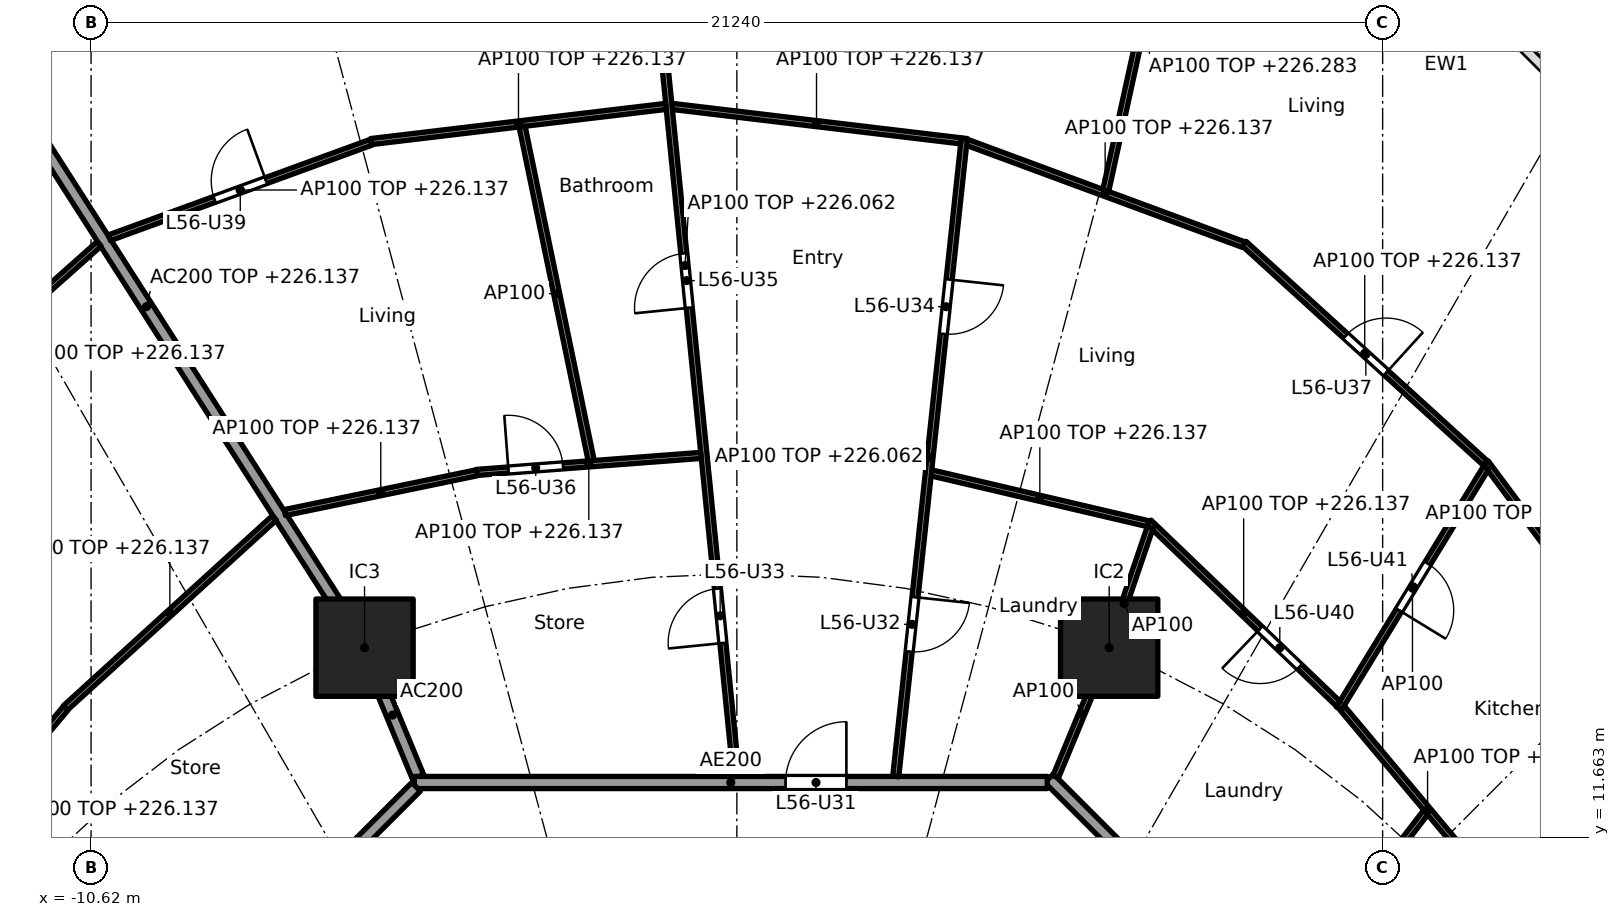
"""IFC4 building model, lengths in metres.
Left out: names, types, materials, properties, quantities, classifications, styles, units other than length and angle.
Written with IfcOpenShell. Run it as: python <this file> out.ifc"""

import sys

from ifc_helpers import new_model, si_unit, direction, frame, frame_2d, origin, origin_2d, place, context, subcontext, project, spatial, rectangle, extrude, element, fill, save


model = new_model("IFC4")
c1 = context("Model", 3, precision=1e-05, world=origin(), true_north=direction((0.0, 1.0)))
c2 = subcontext(c1, "Body", "Model", "MODEL_VIEW")
j1 = project(units=[si_unit("LENGTHUNIT", "METRE"), si_unit("PLANEANGLEUNIT", "RADIAN")], contexts=[c1])
p1 = place(None, origin())
s1 = spatial("IfcSite", under=j1, at=p1, CompositionType="ELEMENT")
p2 = place(p1, origin())
s2 = spatial("IfcBuilding", under=s1, at=p2, CompositionType="ELEMENT")
p3 = place(p2, frame((0.0, 0.0, 223.3)))
s3 = spatial("IfcBuildingStorey", under=s2, at=p3, CompositionType="ELEMENT", Elevation=223.3)
for number, where, z_axis, x_axis in (
    (1, (6.123, 14.782, 0.0), (0.0, 0.0, 1.0), (1.0, 0.0, 0.0)),
    (2, (-6.123, 14.782, 0.0), (0.0, 0.0, 1.0), (1.0, 0.0, 0.0)),
):
    element("IfcColumn", number, at=place(p3, frame(where, z_axis=z_axis, x_axis=x_axis)), inside=s3, PredefinedType="COLUMN", context=c2, shape_type="SweptSolid", body=[
        extrude(rectangle(XDim=1.6, YDim=1.6, at=origin_2d()), origin(), (0.0, 0.0, 1.0), 3.7),
    ])
p4 = place(p3, frame((-5.243, 12.657, 0.0), z_axis=(0.0, 0.0, 1.0), x_axis=(-0.382691608661, 0.923876145736, 0.0)))
e3 = element("IfcWall", 3, at=p4, inside=s3, PredefinedType="PARTITIONING", context=c2, shape_type="SweptSolid", body=[
    extrude(rectangle(XDim=2.2, YDim=0.2, at=frame_2d((1.1, 0.0))), origin(), (0.0, 0.0, 1.0), 3.44),
])
p5 = place(p3, frame((-6.15, 14.824, 0.0), z_axis=(0.0, 0.0, 1.0), x_axis=(-0.538870687577, 0.842388498301, 0.0)))
e4 = element("IfcWall", 4, at=p5, inside=s3, PredefinedType="PARTITIONING", context=c2, shape_type="SweptSolid", body=[
    extrude(rectangle(XDim=13.213, YDim=0.2, at=frame_2d((6.606, 0.0))), origin(), (0.0, 0.0, 1.0), 2.837),
])
p6 = place(p3, frame((12.635, 5.134, 0.0), z_axis=(0.0, 0.0, 1.0), x_axis=(-0.707106781187, 0.707106781187, 0.0)))
e5 = element("IfcWall", 5, at=p6, inside=s3, PredefinedType="PARTITIONING", context=c2, shape_type="SweptSolid", body=[
    extrude(rectangle(XDim=10.609, YDim=0.2, at=frame_2d((5.305, 0.0))), origin(), (0.0, 0.0, 1.0), 3.44),
])
p7 = place(p3, frame((5.104, 12.565, 0.0), z_axis=(0.0, 0.0, 1.0), x_axis=(-1.0, 0.0, 0.0)))
e6 = element("IfcWall", 6, at=p7, inside=s3, PredefinedType="PARTITIONING", context=c2, shape_type="SweptSolid", body=[
    extrude(rectangle(XDim=10.409, YDim=0.2, at=frame_2d((5.205, 0.0))), origin(), (0.0, 0.0, 1.0), 3.44),
])
p8 = place(p7, frame((3.303, 0.0, 0.0)))
e7 = element("IfcOpeningElement", 7, at=p8, cuts=e6, PredefinedType="OPENING", context=c2, shape_type="SweptSolid", body=[
    extrude(rectangle(XDim=1.0, YDim=2.1, at=frame_2d((0.5, 1.05))), frame((0.0, 0.11, 0.0), z_axis=(0.0, -1.0, 0.0), x_axis=(1.0, 0.0, 0.0)), (0.0, 0.0, 1.0), 0.22),
])
p9 = place(p3, frame((-5.275, 12.494, 0.0), z_axis=(0.0, 0.0, 1.0), x_axis=(-0.707106781187, -0.707106781187, 0.0)))
e8 = element("IfcWall", 8, at=p9, inside=s3, PredefinedType="PARTITIONING", context=c2, shape_type="SweptSolid", body=[
    extrude(rectangle(XDim=10.209, YDim=0.2, at=frame_2d((5.104, 0.0))), origin(), (0.0, 0.0, 1.0), 3.44),
])
p10 = place(p9, frame((6.339, 0.0, 0.0)))
e9 = element("IfcOpeningElement", 9, at=p10, cuts=e8, PredefinedType="OPENING", context=c2, shape_type="SweptSolid", body=[
    extrude(rectangle(XDim=1.0, YDim=2.1, at=frame_2d((0.5, 1.05))), frame((0.0, 0.11, 0.0), z_axis=(0.0, -1.0, 0.0), x_axis=(1.0, 0.0, 0.0)), (0.0, 0.0, 1.0), 0.22),
])
p11 = place(p3, frame((12.759, 10.443, 0.0), z_axis=(0.0, 0.0, 1.0), x_axis=(-0.642225196965, 0.766516011825, 0.0)))
e10 = element("IfcWall", 10, at=p11, inside=s3, PredefinedType="PARTITIONING", context=c2, shape_type="SweptSolid", body=[
    extrude(rectangle(XDim=4.361, YDim=0.1, at=frame_2d((2.18, 0.0))), origin(), (0.0, 0.0, 1.0), 2.837),
])
p12 = place(p3, frame((15.621, 13.374, 0.0), z_axis=(0.0, 0.0, 1.0), x_axis=(-0.596165830899, 0.802861321816, 0.0)))
e11 = element("IfcWall", 11, at=p12, inside=s3, PredefinedType="PARTITIONING", context=c2, shape_type="SweptSolid", body=[
    extrude(rectangle(XDim=5.542, YDim=0.1, at=frame_2d((2.771, 0.0))), origin(), (0.0, 0.0, 1.0), 2.837),
])
p13 = place(p3, frame((8.946, 8.964, 0.0), z_axis=(0.0, 0.0, 1.0), x_axis=(0.608213063121, 0.793773815296, 0.0)))
e12 = element("IfcWall", 12, at=p13, inside=s3, PredefinedType="PARTITIONING", context=c2, shape_type="SweptSolid", body=[
    extrude(rectangle(XDim=3.918, YDim=0.1, at=frame_2d((1.959, 0.0))), origin(), (0.0, 0.0, 1.0), 2.762),
])
p14 = place(p3, frame((9.9, 13.781, 0.0), z_axis=(0.0, 0.0, 1.0), x_axis=(0.521464905534, 0.853272730313, 0.0)))
e13 = element("IfcWall", 13, at=p14, inside=s3, PredefinedType="PARTITIONING", context=c2, shape_type="SweptSolid", body=[
    extrude(rectangle(XDim=4.641, YDim=0.1, at=frame_2d((2.32, 0.0))), origin(), (0.0, 0.0, 1.0), 3.44),
])
p15 = place(p14, frame((1.895, 0.0, 0.0)))
e14 = element("IfcOpeningElement", 14, at=p15, cuts=e13, PredefinedType="OPENING", context=c2, shape_type="SweptSolid", body=[
    extrude(rectangle(XDim=0.9, YDim=2.1, at=frame_2d((0.45, 1.05))), frame((0.0, 0.06, 0.0), z_axis=(0.0, -1.0, 0.0), x_axis=(1.0, 0.0, 0.0)), (0.0, 0.0, 1.0), 0.12),
])
p16 = place(p3, frame((9.89, 13.858, 0.0), z_axis=(0.0, 0.0, 1.0), x_axis=(-0.72167233993, 0.692234811159, 0.0)))
e15 = element("IfcWall", 15, at=p16, inside=s3, PredefinedType="PARTITIONING", context=c2, shape_type="SweptSolid", body=[
    extrude(rectangle(XDim=4.313, YDim=0.1, at=frame_2d((2.156, 0.0))), origin(), (0.0, 0.0, 1.0), 2.837),
])
p17 = place(p16, frame((0.883, 0.0, 0.0)))
e16 = element("IfcOpeningElement", 16, at=p17, cuts=e15, PredefinedType="OPENING", context=c2, shape_type="SweptSolid", body=[
    extrude(rectangle(XDim=0.9, YDim=2.1, at=frame_2d((0.45, 1.05))), frame((0.0, 0.06, 0.0), z_axis=(0.0, -1.0, 0.0), x_axis=(1.0, 0.0, 0.0)), (0.0, 0.0, 1.0), 0.12),
])
p18 = place(p3, frame((12.31, 17.817, 0.0), z_axis=(0.0, 0.0, 1.0), x_axis=(-0.739697052892, 0.672940019573, 0.0)))
e17 = element("IfcWall", 17, at=p18, inside=s3, PredefinedType="PARTITIONING", context=c2, shape_type="SweptSolid", body=[
    extrude(rectangle(XDim=5.365, YDim=0.1, at=frame_2d((2.683, 0.0))), origin(), (0.0, 0.0, 1.0), 2.837),
])
p19 = place(p18, frame((2.208, 0.0, 0.0)))
e18 = element("IfcOpeningElement", 18, at=p19, cuts=e17, PredefinedType="OPENING", context=c2, shape_type="SweptSolid", body=[
    extrude(rectangle(XDim=0.9, YDim=2.1, at=frame_2d((0.45, 1.05))), frame((0.0, 0.06, 0.0), z_axis=(0.0, -1.0, 0.0), x_axis=(1.0, 0.0, 0.0)), (0.0, 0.0, 1.0), 0.12),
])
p20 = place(p3, frame((5.243, 12.657, 0.0), z_axis=(0.0, 0.0, 1.0), x_axis=(0.382719158442, 0.923864733477, 0.0)))
e19 = element("IfcWall", 19, at=p20, inside=s3, PredefinedType="PARTITIONING", context=c2, shape_type="SweptSolid", body=[
    extrude(rectangle(XDim=2.25, YDim=0.1, at=frame_2d((1.125, 0.0))), origin(), (0.0, 0.0, 1.0), 3.44),
])
p21 = place(p3, frame((6.139, 14.829, 0.0), z_axis=(0.0, 0.0, 1.0), x_axis=(0.32278593828, 0.946471995385, 0.0)))
e20 = element("IfcWall", 20, at=p21, inside=s3, PredefinedType="PARTITIONING", context=c2, shape_type="SweptSolid", body=[
    extrude(rectangle(XDim=2.042, YDim=0.1, at=frame_2d((1.021, 0.0))), origin(), (0.0, 0.0, 1.0), 3.44),
])
p22 = place(p3, frame((6.766, 16.82, 0.0), z_axis=(0.0, 0.0, 1.0), x_axis=(-0.973612608559, 0.22820711745, 0.0)))
e21 = element("IfcWall", 21, at=p22, inside=s3, PredefinedType="PARTITIONING", context=c2, shape_type="SweptSolid", body=[
    extrude(rectangle(XDim=3.663, YDim=0.1, at=frame_2d((1.832, 0.0))), origin(), (0.0, 0.0, 1.0), 2.837),
])
p23 = place(p3, frame((8.331, 21.411, 0.0), z_axis=(0.0, 0.0, 1.0), x_axis=(-0.937891982431, 0.346927412136, 0.0)))
e22 = element("IfcWall", 22, at=p23, inside=s3, PredefinedType="PARTITIONING", context=c2, shape_type="SweptSolid", body=[
    extrude(rectangle(XDim=4.85, YDim=0.1, at=frame_2d((2.425, 0.0))), origin(), (0.0, 0.0, 1.0), 2.837),
])
p24 = place(p3, frame((6.067, 22.301, 0.0), z_axis=(0.0, 0.0, 1.0), x_axis=(0.214401821533, 0.976745544614, 0.0)))
e23 = element("IfcWall", 23, at=p24, inside=s3, PredefinedType="PARTITIONING", context=c2, shape_type="SweptSolid", body=[
    extrude(rectangle(XDim=6.228, YDim=0.1, at=frame_2d((3.114, 0.0))), origin(), (0.0, 0.0, 1.0), 2.983),
])
p25 = place(p24, frame((2.664, 0.0, 0.0)))
e24 = element("IfcOpeningElement", 24, at=p25, cuts=e23, PredefinedType="OPENING", context=c2, shape_type="SweptSolid", body=[
    extrude(rectangle(XDim=0.9, YDim=2.1, at=frame_2d((0.45, 1.05))), frame((0.0, 0.06, 0.0), z_axis=(0.0, -1.0, 0.0), x_axis=(1.0, 0.0, 0.0)), (0.0, 0.0, 1.0), 0.12),
])
p26 = place(p3, frame((2.613, 12.664, 0.0), z_axis=(0.0, 0.0, 1.0), x_axis=(0.106823825758, 0.994277964279, 0.0)))
e25 = element("IfcWall", 25, at=p26, inside=s3, PredefinedType="PARTITIONING", context=c2, shape_type="SweptSolid", body=[
    extrude(rectangle(XDim=10.556, YDim=0.1, at=frame_2d((5.278, 0.0))), origin(), (0.0, 0.0, 1.0), 2.762),
])
p27 = place(p26, frame((2.066, 0.0, 0.0)))
e26 = element("IfcOpeningElement", 26, at=p27, cuts=e25, PredefinedType="OPENING", context=c2, shape_type="SweptSolid", body=[
    extrude(rectangle(XDim=0.9, YDim=2.1, at=frame_2d((0.45, 1.05))), frame((0.0, 0.06, 0.0), z_axis=(0.0, -1.0, 0.0), x_axis=(1.0, 0.0, 0.0)), (0.0, 0.0, 1.0), 0.12),
])
p28 = place(p26, frame((7.32, 0.0, 0.0)))
e27 = element("IfcOpeningElement", 27, at=p28, cuts=e25, PredefinedType="OPENING", context=c2, shape_type="SweptSolid", body=[
    extrude(rectangle(XDim=0.9, YDim=2.1, at=frame_2d((0.45, 1.05))), frame((0.0, 0.06, 0.0), z_axis=(0.0, -1.0, 0.0), x_axis=(1.0, 0.0, 0.0)), (0.0, 0.0, 1.0), 0.12),
])
p29 = place(p3, frame((3.686, 23.117, 0.0), z_axis=(0.0, 0.0, 1.0), x_axis=(-0.992965872314, 0.11840091393, 0.0)))
e28 = element("IfcWall", 28, at=p29, inside=s3, PredefinedType="PARTITIONING", context=c2, shape_type="SweptSolid", body=[
    extrude(rectangle(XDim=4.786, YDim=0.1, at=frame_2d((2.393, 0.0))), origin(), (0.0, 0.0, 1.0), 2.837),
])
p30 = place(p3, frame((-0.01, 12.664, 0.0), z_axis=(0.0, 0.0, 1.0), x_axis=(-0.099808591851, 0.995006655753, 0.0)))
e29 = element("IfcWall", 29, at=p30, inside=s3, PredefinedType="PARTITIONING", context=c2, shape_type="SweptSolid", body=[
    extrude(rectangle(XDim=16.888, YDim=0.1, at=frame_2d((8.444, 0.0))), origin(), (0.0, 0.0, 1.0), 2.762),
])
p31 = place(p30, frame((2.205, 0.0, 0.0)))
e30 = element("IfcOpeningElement", 30, at=p31, cuts=e29, PredefinedType="OPENING", context=c2, shape_type="SweptSolid", body=[
    extrude(rectangle(XDim=0.9, YDim=2.1, at=frame_2d((0.45, 1.05))), frame((0.0, 0.06, 0.0), z_axis=(0.0, -1.0, 0.0), x_axis=(1.0, 0.0, 0.0)), (0.0, 0.0, 1.0), 0.12),
])
p32 = place(p30, frame((7.745, 0.0, 0.0)))
e31 = element("IfcOpeningElement", 31, at=p32, cuts=e29, PredefinedType="OPENING", context=c2, shape_type="SweptSolid", body=[
    extrude(rectangle(XDim=0.9, YDim=2.1, at=frame_2d((0.45, 1.05))), frame((0.0, 0.06, 0.0), z_axis=(0.0, -1.0, 0.0), x_axis=(1.0, 0.0, 0.0)), (0.0, 0.0, 1.0), 0.12),
])
p33 = place(p3, frame((-0.59, 17.944, 0.0), z_axis=(0.0, 0.0, 1.0), x_axis=(-0.997133495787, -0.075662352452, 0.0)))
e32 = element("IfcWall", 32, at=p33, inside=s3, PredefinedType="PARTITIONING", context=c2, shape_type="SweptSolid", body=[
    extrude(rectangle(XDim=3.701, YDim=0.1, at=frame_2d((1.851, 0.0))), origin(), (0.0, 0.0, 1.0), 2.837),
])
p34 = place(p33, frame((2.276, 0.0, 0.0)))
e33 = element("IfcOpeningElement", 33, at=p34, cuts=e32, PredefinedType="OPENING", context=c2, shape_type="SweptSolid", body=[
    extrude(rectangle(XDim=0.9, YDim=2.1, at=frame_2d((0.45, 1.05))), frame((0.0, 0.06, 0.0), z_axis=(0.0, -1.0, 0.0), x_axis=(1.0, 0.0, 0.0)), (0.0, 0.0, 1.0), 0.12),
])
p35 = place(p3, frame((-1.166, 23.683, 0.0), z_axis=(0.0, 0.0, 1.0), x_axis=(-0.992961712415, -0.118435795593, 0.0)))
e34 = element("IfcWall", 34, at=p35, inside=s3, PredefinedType="PARTITIONING", context=c2, shape_type="SweptSolid", body=[
    extrude(rectangle(XDim=4.885, YDim=0.1, at=frame_2d((2.443, 0.0))), origin(), (0.0, 0.0, 1.0), 2.837),
])
p36 = place(p3, frame((-2.395, 17.857, 0.0), z_axis=(0.0, 0.0, 1.0), x_axis=(-0.20251351451, 0.979279467997, 0.0)))
e35 = element("IfcWall", 35, at=p36, inside=s3, PredefinedType="PARTITIONING", context=c2, shape_type="SweptSolid", body=[
    extrude(rectangle(XDim=5.611, YDim=0.1, at=frame_2d((2.805, 0.0))), origin(), (0.0, 0.0, 1.0), 3.44),
])
p37 = place(p3, frame((-4.28, 17.657, 0.0), z_axis=(0.0, 0.0, 1.0), x_axis=(-0.979195545385, -0.202918909661, 0.0)))
e36 = element("IfcWall", 36, at=p37, inside=s3, PredefinedType="PARTITIONING", context=c2, shape_type="SweptSolid", body=[
    extrude(rectangle(XDim=3.221, YDim=0.1, at=frame_2d((1.61, 0.0))), origin(), (0.0, 0.0, 1.0), 2.837),
])
p38 = place(p3, frame((-6.014, 23.094, 0.0), z_axis=(0.0, 0.0, 1.0), x_axis=(-0.939433575811, -0.342731026665, 0.0)))
e37 = element("IfcWall", 37, at=p38, inside=s3, PredefinedType="PARTITIONING", context=c2, shape_type="SweptSolid", body=[
    extrude(rectangle(XDim=4.583, YDim=0.1, at=frame_2d((2.291, 0.0))), origin(), (0.0, 0.0, 1.0), 2.837),
])
p39 = place(p38, frame((1.841, 0.0, 0.0)))
e38 = element("IfcOpeningElement", 38, at=p39, cuts=e37, PredefinedType="OPENING", context=c2, shape_type="SweptSolid", body=[
    extrude(rectangle(XDim=0.9, YDim=2.1, at=frame_2d((0.45, 1.05))), frame((0.0, 0.06, 0.0), z_axis=(0.0, -1.0, 0.0), x_axis=(1.0, 0.0, 0.0)), (0.0, 0.0, 1.0), 0.12),
])
p40 = place(p3, frame((-7.605, 16.917, 0.0), z_axis=(0.0, 0.0, 1.0), x_axis=(-0.739828340504, -0.672795679673, 0.0)))
e39 = element("IfcWall", 39, at=p40, inside=s3, PredefinedType="PARTITIONING", context=c2, shape_type="SweptSolid", body=[
    extrude(rectangle(XDim=4.647, YDim=0.1, at=frame_2d((2.324, 0.0))), origin(), (0.0, 0.0, 1.0), 2.837),
])
p41 = place(p3, frame((-10.488, 21.422, 0.0), z_axis=(0.0, 0.0, 1.0), x_axis=(-0.747148551049, -0.664657086523, 0.0)))
e40 = element("IfcWall", 40, at=p41, inside=s3, PredefinedType="PARTITIONING", context=c2, shape_type="SweptSolid", body=[
    extrude(rectangle(XDim=5.425, YDim=0.1, at=frame_2d((2.712, 0.0))), origin(), (0.0, 0.0, 1.0), 2.837),
])
p42 = place(p41, frame((2.262, 0.0, 0.0)))
e41 = element("IfcOpeningElement", 41, at=p42, cuts=e40, PredefinedType="OPENING", context=c2, shape_type="SweptSolid", body=[
    extrude(rectangle(XDim=0.9, YDim=2.1, at=frame_2d((0.45, 1.05))), frame((0.0, 0.06, 0.0), z_axis=(0.0, -1.0, 0.0), x_axis=(1.0, 0.0, 0.0)), (0.0, 0.0, 1.0), 0.12),
])
p43 = place(p3, frame((-11.039, 13.785, 0.0), z_axis=(0.0, 0.0, 1.0), x_axis=(-0.642323585424, -0.766433566337, 0.0)))
e42 = element("IfcWall", 42, at=p43, inside=s3, PredefinedType="PARTITIONING", context=c2, shape_type="SweptSolid", body=[
    extrude(rectangle(XDim=2.13, YDim=0.1, at=frame_2d((1.065, 0.0))), origin(), (0.0, 0.0, 1.0), 2.837),
])
p44 = place(p3, frame((-8.959, 8.952, 0.0), z_axis=(0.0, 0.0, 1.0), x_axis=(-0.740140081805, 0.672452719011, 0.0)))
e43 = element("IfcWall", 43, at=p44, inside=s3, PredefinedType="PARTITIONING", context=c2, shape_type="SweptSolid", body=[
    extrude(rectangle(XDim=9.775, YDim=0.1, at=frame_2d((4.887, 0.0))), origin(), (0.0, 0.0, 1.0), 2.762),
])
p45 = place(p44, frame((1.901, 0.0, 0.0)))
e44 = element("IfcOpeningElement", 44, at=p45, cuts=e43, PredefinedType="OPENING", context=c2, shape_type="SweptSolid", body=[
    extrude(rectangle(XDim=0.9, YDim=2.1, at=frame_2d((0.45, 1.05))), frame((0.0, 0.06, 0.0), z_axis=(0.0, -1.0, 0.0), x_axis=(1.0, 0.0, 0.0)), (0.0, 0.0, 1.0), 0.12),
])
p46 = place(p44, frame((6.789, 0.0, 0.0)))
e45 = element("IfcOpeningElement", 45, at=p46, cuts=e43, PredefinedType="OPENING", context=c2, shape_type="SweptSolid", body=[
    extrude(rectangle(XDim=0.9, YDim=2.1, at=frame_2d((0.45, 1.05))), frame((0.0, 0.06, 0.0), z_axis=(0.0, -1.0, 0.0), x_axis=(1.0, 0.0, 0.0)), (0.0, 0.0, 1.0), 0.12),
])
p47 = place(p8, frame((1.0, 0.0, 0.0), x_axis=(-1.0, 0.0, 0.0)))
e46 = element("IfcDoor", 46, at=p47, inside=s3, OperationType="SINGLE_SWING_RIGHT", PredefinedType="DOOR", context=c2, shape_type="SweptSolid", body=[
    extrude(rectangle(XDim=1.0, YDim=2.1, at=frame_2d((0.5, 1.05))), frame((0.0, 0.025, 0.0), z_axis=(0.0, -1.0, 0.0), x_axis=(1.0, 0.0, 0.0)), (0.0, 0.0, 1.0), 0.05),
])
fill(e7, e46)
p48 = place(p27, frame((0.9, 0.0, 0.0), x_axis=(-1.0, 0.0, 0.0)))
e47 = element("IfcDoor", 47, at=p48, inside=s3, OperationType="SINGLE_SWING_LEFT", PredefinedType="DOOR", context=c2, shape_type="SweptSolid", body=[
    extrude(rectangle(XDim=0.9, YDim=2.1, at=frame_2d((0.45, 1.05))), frame((0.0, 0.025, 0.0), z_axis=(0.0, -1.0, 0.0), x_axis=(1.0, 0.0, 0.0)), (0.0, 0.0, 1.0), 0.05),
])
fill(e26, e47)
p49 = place(p31, origin())
e48 = element("IfcDoor", 48, at=p49, inside=s3, OperationType="SINGLE_SWING_LEFT", PredefinedType="DOOR", context=c2, shape_type="SweptSolid", body=[
    extrude(rectangle(XDim=0.9, YDim=2.1, at=frame_2d((0.45, 1.05))), frame((0.0, 0.025, 0.0), z_axis=(0.0, -1.0, 0.0), x_axis=(1.0, 0.0, 0.0)), (0.0, 0.0, 1.0), 0.05),
])
fill(e30, e48)
p50 = place(p28, frame((0.9, 0.0, 0.0), x_axis=(-1.0, 0.0, 0.0)))
e49 = element("IfcDoor", 49, at=p50, inside=s3, OperationType="SINGLE_SWING_LEFT", PredefinedType="DOOR", context=c2, shape_type="SweptSolid", body=[
    extrude(rectangle(XDim=0.9, YDim=2.1, at=frame_2d((0.45, 1.05))), frame((0.0, 0.025, 0.0), z_axis=(0.0, -1.0, 0.0), x_axis=(1.0, 0.0, 0.0)), (0.0, 0.0, 1.0), 0.05),
])
fill(e27, e49)
p51 = place(p32, origin())
e50 = element("IfcDoor", 50, at=p51, inside=s3, OperationType="SINGLE_SWING_LEFT", PredefinedType="DOOR", context=c2, shape_type="SweptSolid", body=[
    extrude(rectangle(XDim=0.9, YDim=2.1, at=frame_2d((0.45, 1.05))), frame((0.0, 0.025, 0.0), z_axis=(0.0, -1.0, 0.0), x_axis=(1.0, 0.0, 0.0)), (0.0, 0.0, 1.0), 0.05),
])
fill(e31, e50)
p52 = place(p34, frame((0.9, 0.0, 0.0), x_axis=(-1.0, 0.0, 0.0)))
e51 = element("IfcDoor", 51, at=p52, inside=s3, OperationType="SINGLE_SWING_LEFT", PredefinedType="DOOR", context=c2, shape_type="SweptSolid", body=[
    extrude(rectangle(XDim=0.9, YDim=2.1, at=frame_2d((0.45, 1.05))), frame((0.0, 0.025, 0.0), z_axis=(0.0, -1.0, 0.0), x_axis=(1.0, 0.0, 0.0)), (0.0, 0.0, 1.0), 0.05),
])
fill(e33, e51)
p53 = place(p19, frame((0.9, 0.0, 0.0), x_axis=(-1.0, 0.0, 0.0)))
e52 = element("IfcDoor", 52, at=p53, inside=s3, OperationType="SINGLE_SWING_RIGHT", PredefinedType="DOOR", context=c2, shape_type="SweptSolid", body=[
    extrude(rectangle(XDim=0.9, YDim=2.1, at=frame_2d((0.45, 1.05))), frame((0.0, 0.025, 0.0), z_axis=(0.0, -1.0, 0.0), x_axis=(1.0, 0.0, 0.0)), (0.0, 0.0, 1.0), 0.05),
])
fill(e18, e52)
p54 = place(p39, frame((0.9, 0.0, 0.0), x_axis=(-1.0, 0.0, 0.0)))
e53 = element("IfcDoor", 53, at=p54, inside=s3, OperationType="SINGLE_SWING_RIGHT", PredefinedType="DOOR", context=c2, shape_type="SweptSolid", body=[
    extrude(rectangle(XDim=0.9, YDim=2.1, at=frame_2d((0.45, 1.05))), frame((0.0, 0.025, 0.0), z_axis=(0.0, -1.0, 0.0), x_axis=(1.0, 0.0, 0.0)), (0.0, 0.0, 1.0), 0.05),
])
fill(e38, e53)
p55 = place(p17, origin())
e54 = element("IfcDoor", 54, at=p55, inside=s3, OperationType="SINGLE_SWING_RIGHT", PredefinedType="DOOR", context=c2, shape_type="SweptSolid", body=[
    extrude(rectangle(XDim=0.9, YDim=2.1, at=frame_2d((0.45, 1.05))), frame((0.0, 0.025, 0.0), z_axis=(0.0, -1.0, 0.0), x_axis=(1.0, 0.0, 0.0)), (0.0, 0.0, 1.0), 0.05),
])
fill(e16, e54)
p56 = place(p15, frame((0.9, 0.0, 0.0), x_axis=(-1.0, 0.0, 0.0)))
e55 = element("IfcDoor", 55, at=p56, inside=s3, OperationType="SINGLE_SWING_RIGHT", PredefinedType="DOOR", context=c2, shape_type="SweptSolid", body=[
    extrude(rectangle(XDim=0.9, YDim=2.1, at=frame_2d((0.45, 1.05))), frame((0.0, 0.025, 0.0), z_axis=(0.0, -1.0, 0.0), x_axis=(1.0, 0.0, 0.0)), (0.0, 0.0, 1.0), 0.05),
])
fill(e14, e55)
save(model, sys.argv[1])
